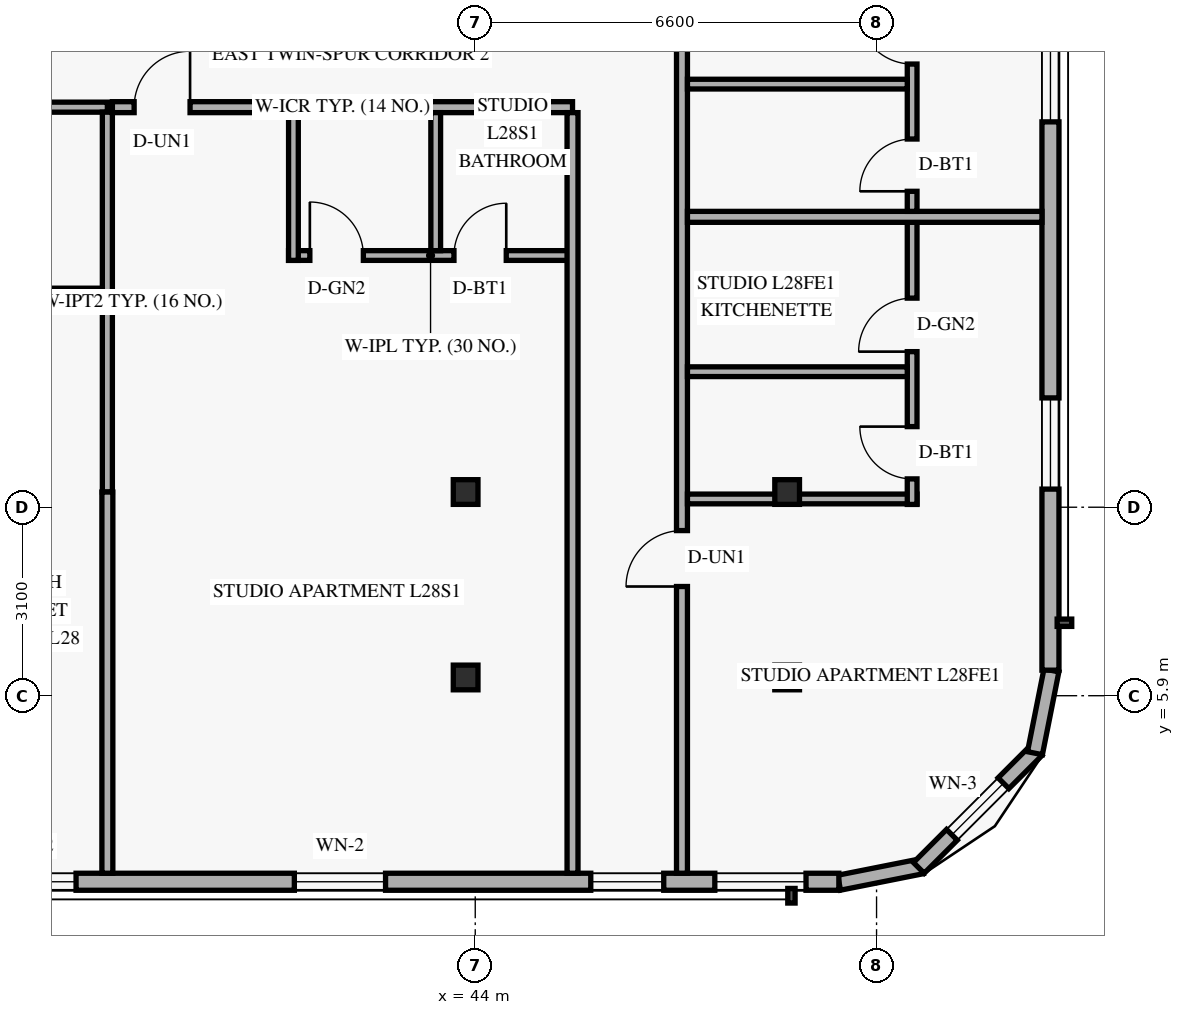
"""IFC4 building model, lengths in metres.
Left out: names, types, materials, properties, quantities, classifications, styles, units other than length and angle.
Written with IfcOpenShell. Run it as: python <this file> out.ifc"""

import sys

from ifc_helpers import new_model, si_unit, direction, frame, frame_2d, origin, origin_2d, place, context, subcontext, project, spatial, rectangle, hollow_rectangle, extrude, element, fill, save


model = new_model("IFC4")
c1 = context("Model", 3, precision=1e-05, world=origin(), true_north=direction((0.0, 1.0)))
c2 = subcontext(c1, "Body", "Model", "MODEL_VIEW")
j1 = project(units=[si_unit("LENGTHUNIT", "METRE"), si_unit("PLANEANGLEUNIT", "RADIAN")], contexts=[c1])
p1 = place(None, origin())
s1 = spatial("IfcSite", under=j1, at=p1, CompositionType="ELEMENT")
p2 = place(p1, origin())
s2 = spatial("IfcBuilding", under=s1, at=p2, CompositionType="ELEMENT")
p3 = place(p2, frame((0.0, 0.0, 109.8)))
s3 = spatial("IfcBuildingStorey", under=s2, at=p3, CompositionType="ELEMENT", Elevation=109.8)
for number, where, z_axis, x_axis in (
    (1, (43.779, 6.2, 0.0), (0.035, 0.0, 0.999), (0.0, 1.0, 0.0)),
    (2, (43.779, 9.25, 0.0), (0.035, 0.0, 0.999), (0.0, 1.0, 0.0)),
):
    element("IfcColumn", number, at=place(p3, frame(where, z_axis=z_axis, x_axis=x_axis)), inside=s3, PredefinedType="COLUMN", context=c2, shape_type="SweptSolid", body=[
        extrude(hollow_rectangle(XDim=0.406, YDim=0.406, WallThickness=0.016, at=origin_2d()), origin(), (0.0, 0.0, 1.0), 3.602),
    ])
for number, where, z_axis, x_axis in (
    (3, (49.025, 6.2, 0.0), (0.058, 0.0, 0.998), (0.0, 1.0, 0.0)),
    (4, (49.025, 9.25, 0.0), (0.058, 0.0, 0.998), (0.0, 1.0, 0.0)),
):
    element("IfcColumn", number, at=place(p3, frame(where, z_axis=z_axis, x_axis=x_axis)), inside=s3, PredefinedType="COLUMN", context=c2, shape_type="SweptSolid", body=[
        extrude(hollow_rectangle(XDim=0.406, YDim=0.406, WallThickness=0.016, at=origin_2d()), origin(), (0.0, 0.0, 1.0), 3.606),
    ])
p4 = place(p3, frame((49.983, 2.824, 0.0), z_axis=(0.0, 0.0, 1.0), x_axis=(0.980809899341, 0.19496651342, 0.0)))
e5 = element("IfcWall", 5, at=p4, inside=s3, PredefinedType="SOLIDWALL", context=c2, shape_type="SweptSolid", body=[
    extrude(rectangle(XDim=1.389, YDim=0.25, at=frame_2d((0.694, 0.0))), origin(), (0.0, 0.0, 1.0), 3.36),
])
p5 = place(p3, frame((51.295, 3.068, 0.0), z_axis=(0.0, 0.0, 1.0), x_axis=(0.707151344399, 0.707062215165, 0.0)))
e6 = element("IfcWall", 6, at=p5, inside=s3, PredefinedType="SOLIDWALL", context=c2, shape_type="SweptSolid", body=[
    extrude(rectangle(XDim=2.739, YDim=0.25, at=frame_2d((1.37, 0.0))), origin(), (0.0, 0.0, 1.0), 3.36),
])
p6 = place(p5, frame((0.77, 0.0, 0.85)))
e7 = element("IfcOpeningElement", 7, at=p6, cuts=e6, PredefinedType="OPENING", context=c2, shape_type="SweptSolid", body=[
    extrude(rectangle(XDim=1.2, YDim=1.5, at=frame_2d((0.6, 0.75))), frame((0.0, 0.135, 0.0), z_axis=(0.0, -1.0, 0.0), x_axis=(1.0, 0.0, 0.0)), (0.0, 0.0, 1.0), 0.27),
])
p7 = place(p3, frame((53.205, 4.955, 0.0), z_axis=(0.0, 0.0, 1.0), x_axis=(0.195000137217, 0.980803214965, 0.0)))
e8 = element("IfcWall", 8, at=p7, inside=s3, PredefinedType="SOLIDWALL", context=c2, shape_type="SweptSolid", body=[
    extrude(rectangle(XDim=1.388, YDim=0.25, at=frame_2d((0.694, 0.0))), origin(), (0.0, 0.0, 1.0), 3.36),
])
p8 = place(p3, frame((34.4, 2.84, 0.0), z_axis=(0.0, 0.0, 1.0), x_axis=(1.0, 0.0, 0.0)))
e9 = element("IfcWall", 9, at=p8, inside=s3, PredefinedType="SOLIDWALL", context=c2, shape_type="SweptSolid", body=[
    extrude(rectangle(XDim=15.58, YDim=0.28, at=frame_2d((7.79, 0.0))), origin(), (0.0, 0.0, 1.0), 3.36),
])
p9 = place(p8, frame((1.535, 0.0, 0.85)))
e10 = element("IfcOpeningElement", 10, at=p9, cuts=e9, PredefinedType="OPENING", context=c2, shape_type="SweptSolid", body=[
    extrude(rectangle(XDim=1.5, YDim=1.55, at=frame_2d((0.75, 0.775))), frame((0.0, 0.15, 0.0), z_axis=(0.0, -1.0, 0.0), x_axis=(1.0, 0.0, 0.0)), (0.0, 0.0, 1.0), 0.3),
])
p10 = place(p8, frame((6.625, 0.0, 0.85)))
e11 = element("IfcOpeningElement", 11, at=p10, cuts=e9, PredefinedType="OPENING", context=c2, shape_type="SweptSolid", body=[
    extrude(rectangle(XDim=1.5, YDim=1.55, at=frame_2d((0.75, 0.775))), frame((0.0, 0.15, 0.0), z_axis=(0.0, -1.0, 0.0), x_axis=(1.0, 0.0, 0.0)), (0.0, 0.0, 1.0), 0.3),
])
p11 = place(p8, frame((11.5, 0.0, 0.85)))
e12 = element("IfcOpeningElement", 12, at=p11, cuts=e9, PredefinedType="OPENING", context=c2, shape_type="SweptSolid", body=[
    extrude(rectangle(XDim=1.2, YDim=1.5, at=frame_2d((0.6, 0.75))), frame((0.0, 0.15, 0.0), z_axis=(0.0, -1.0, 0.0), x_axis=(1.0, 0.0, 0.0)), (0.0, 0.0, 1.0), 0.3),
])
p12 = place(p8, frame((13.54, 0.0, 0.85)))
e13 = element("IfcOpeningElement", 13, at=p12, cuts=e9, PredefinedType="OPENING", context=c2, shape_type="SweptSolid", body=[
    extrude(rectangle(XDim=1.5, YDim=1.55, at=frame_2d((0.75, 0.775))), frame((0.0, 0.15, 0.0), z_axis=(0.0, -1.0, 0.0), x_axis=(1.0, 0.0, 0.0)), (0.0, 0.0, 1.0), 0.3),
])
p13 = place(p3, frame((53.46, 6.32, 0.0), z_axis=(0.0, 0.0, 1.0), x_axis=(0.0, 1.0, 0.0)))
e14 = element("IfcWall", 14, at=p13, inside=s3, PredefinedType="SOLIDWALL", context=c2, shape_type="SweptSolid", body=[
    extrude(rectangle(XDim=12.08, YDim=0.28, at=frame_2d((6.04, 0.0))), origin(), (0.0, 0.0, 1.0), 3.36),
])
p14 = place(p13, frame((2.978, 0.0, 0.85)))
e15 = element("IfcOpeningElement", 15, at=p14, cuts=e14, PredefinedType="OPENING", context=c2, shape_type="SweptSolid", body=[
    extrude(rectangle(XDim=1.5, YDim=1.55, at=frame_2d((0.75, 0.775))), frame((0.0, 0.15, 0.0), z_axis=(0.0, -1.0, 0.0), x_axis=(1.0, 0.0, 0.0)), (0.0, 0.0, 1.0), 0.3),
])
p15 = place(p13, frame((9.018, 0.0, 0.85)))
e16 = element("IfcOpeningElement", 16, at=p15, cuts=e14, PredefinedType="OPENING", context=c2, shape_type="SweptSolid", body=[
    extrude(rectangle(XDim=1.5, YDim=1.55, at=frame_2d((0.75, 0.775))), frame((0.0, 0.15, 0.0), z_axis=(0.0, -1.0, 0.0), x_axis=(1.0, 0.0, 0.0)), (0.0, 0.0, 1.0), 0.3),
])
p16 = place(p3, frame((32.732, 15.58, 0.0), z_axis=(0.0, 0.0, 1.0), x_axis=(1.0, 0.0, 0.0)))
e17 = element("IfcWall", 17, at=p16, inside=s3, PredefinedType="PARTITIONING", context=c2, shape_type="SweptSolid", body=[
    extrude(rectangle(XDim=5.218, YDim=0.165, at=frame_2d((2.609, 0.0))), origin(), (0.0, 0.0, 1.0), 2.731),
])
p17 = place(p16, frame((2.867, 0.0, 0.0)))
e18 = element("IfcOpeningElement", 18, at=p17, cuts=e17, PredefinedType="OPENING", context=c2, shape_type="SweptSolid", body=[
    extrude(rectangle(XDim=0.95, YDim=2.15, at=frame_2d((0.475, 1.075))), frame((0.0, 0.093, 0.0), z_axis=(0.0, -1.0, 0.0), x_axis=(1.0, 0.0, 0.0)), (0.0, 0.0, 1.0), 0.185),
])
p18 = place(p3, frame((37.95, 9.25, 0.0), z_axis=(0.0, 0.0, 1.0), x_axis=(0.0, 1.0, 0.0)))
e19 = element("IfcWall", 19, at=p18, inside=s3, PredefinedType="PARTITIONING", context=c2, shape_type="SweptSolid", body=[
    extrude(rectangle(XDim=6.248, YDim=0.165, at=frame_2d((3.124, 0.0))), origin(), (0.0, 0.0, 1.0), 2.731),
])
p19 = place(p3, frame((32.732, 12.52, 0.0), z_axis=(0.0, 0.0, 1.0), x_axis=(1.0, 0.0, 0.0)))
e20 = element("IfcWall", 20, at=p19, inside=s3, PredefinedType="PARTITIONING", context=c2, shape_type="SweptSolid", body=[
    extrude(rectangle(XDim=5.135, YDim=0.165, at=frame_2d((2.567, 0.0))), origin(), (0.0, 0.0, 1.0), 2.731),
])
p20 = place(p19, frame((2.768, 0.0, 0.0)))
e21 = element("IfcOpeningElement", 21, at=p20, cuts=e20, PredefinedType="OPENING", context=c2, shape_type="SweptSolid", body=[
    extrude(rectangle(XDim=0.9, YDim=2.1, at=frame_2d((0.45, 1.05))), frame((0.0, 0.093, 0.0), z_axis=(0.0, -1.0, 0.0), x_axis=(1.0, 0.0, 0.0)), (0.0, 0.0, 1.0), 0.185),
])
p21 = place(p3, frame((38.032, 15.58, 0.0), z_axis=(0.0, 0.0, 1.0), x_axis=(1.0, 0.0, 0.0)))
e22 = element("IfcWall", 22, at=p21, inside=s3, PredefinedType="STANDARD", context=c2, shape_type="SweptSolid", body=[
    extrude(rectangle(XDim=7.568, YDim=0.18, at=frame_2d((3.784, 0.0))), origin(), (0.0, 0.0, 1.0), 2.731),
])
p22 = place(p21, frame((0.357, 0.0, 0.0)))
e23 = element("IfcOpeningElement", 23, at=p22, cuts=e22, PredefinedType="OPENING", context=c2, shape_type="SweptSolid", body=[
    extrude(rectangle(XDim=0.92, YDim=2.15, at=frame_2d((0.46, 1.075))), frame((0.0, 0.1, 0.0), z_axis=(0.0, -1.0, 0.0), x_axis=(1.0, 0.0, 0.0)), (0.0, 0.0, 1.0), 0.2),
])
p23 = place(p3, frame((37.95, 2.98, 0.0), z_axis=(0.0, 0.0, 1.0), x_axis=(0.0, 1.0, 0.0)))
e24 = element("IfcWall", 24, at=p23, inside=s3, PredefinedType="PARTITIONING", context=c2, shape_type="SweptSolid", body=[
    extrude(rectangle(XDim=6.27, YDim=0.18, at=frame_2d((3.135, 0.0))), origin(), (0.0, 0.0, 1.0), 2.731),
])
p24 = place(p3, frame((40.93, 13.14, 0.0), z_axis=(0.0, 0.0, 1.0), x_axis=(1.0, 0.0, 0.0)))
e25 = element("IfcWall", 25, at=p24, inside=s3, PredefinedType="PLUMBINGWALL", context=c2, shape_type="SweptSolid", body=[
    extrude(rectangle(XDim=4.67, YDim=0.16, at=frame_2d((2.335, 0.0))), origin(), (0.0, 0.0, 1.0), 2.731),
])
p25 = place(p24, frame((0.35, 0.0, 0.0)))
e26 = element("IfcOpeningElement", 26, at=p25, cuts=e25, PredefinedType="OPENING", context=c2, shape_type="SweptSolid", body=[
    extrude(rectangle(XDim=0.88, YDim=2.12, at=frame_2d((0.44, 1.06))), frame((0.0, 0.09, 0.0), z_axis=(0.0, -1.0, 0.0), x_axis=(1.0, 0.0, 0.0)), (0.0, 0.0, 1.0), 0.18),
])
p26 = place(p24, frame((2.72, 0.0, 0.0)))
e27 = element("IfcOpeningElement", 27, at=p26, cuts=e25, PredefinedType="OPENING", context=c2, shape_type="SweptSolid", body=[
    extrude(rectangle(XDim=0.86, YDim=2.12, at=frame_2d((0.43, 1.06))), frame((0.0, 0.09, 0.0), z_axis=(0.0, -1.0, 0.0), x_axis=(1.0, 0.0, 0.0)), (0.0, 0.0, 1.0), 0.18),
])
p27 = place(p3, frame((41.01, 13.06, 0.0), z_axis=(0.0, 0.0, 1.0), x_axis=(0.0, 1.0, 0.0)))
e28 = element("IfcWall", 28, at=p27, inside=s3, PredefinedType="PLUMBINGWALL", context=c2, shape_type="SweptSolid", body=[
    extrude(rectangle(XDim=2.43, YDim=0.16, at=frame_2d((1.215, 0.0))), origin(), (0.0, 0.0, 1.0), 2.988),
])
p28 = place(p3, frame((43.35, 13.22, 0.0), z_axis=(0.0, 0.0, 1.0), x_axis=(0.0, 1.0, 0.0)))
e29 = element("IfcWall", 29, at=p28, inside=s3, PredefinedType="PLUMBINGWALL", context=c2, shape_type="SweptSolid", body=[
    extrude(rectangle(XDim=2.27, YDim=0.16, at=frame_2d((1.135, 0.0))), origin(), (0.0, 0.0, 1.0), 2.988),
])
p29 = place(p3, frame((47.4, 2.98, 0.0), z_axis=(0.0, 0.0, 1.0), x_axis=(0.0, 1.0, 0.0)))
e30 = element("IfcWall", 30, at=p29, inside=s3, PredefinedType="STANDARD", context=c2, shape_type="SweptSolid", body=[
    extrude(rectangle(XDim=42.04, YDim=0.18, at=frame_2d((21.02, 0.0))), origin(), (0.0, 0.0, 1.0), 2.731),
])
p30 = place(p29, frame((4.716, 0.0, 0.0)))
e31 = element("IfcOpeningElement", 31, at=p30, cuts=e30, PredefinedType="OPENING", context=c2, shape_type="SweptSolid", body=[
    extrude(rectangle(XDim=0.92, YDim=2.15, at=frame_2d((0.46, 1.075))), frame((0.0, 0.1, 0.0), z_axis=(0.0, -1.0, 0.0), x_axis=(1.0, 0.0, 0.0)), (0.0, 0.0, 1.0), 0.2),
])
p31 = place(p29, frame((15.796, 0.0, 0.0)))
e32 = element("IfcOpeningElement", 32, at=p31, cuts=e30, PredefinedType="OPENING", context=c2, shape_type="SweptSolid", body=[
    extrude(rectangle(XDim=0.92, YDim=2.15, at=frame_2d((0.46, 1.075))), frame((0.0, 0.1, 0.0), z_axis=(0.0, -1.0, 0.0), x_axis=(1.0, 0.0, 0.0)), (0.0, 0.0, 1.0), 0.2),
])
p32 = place(p29, frame((23.565, 0.0, 0.0)))
e33 = element("IfcOpeningElement", 33, at=p32, cuts=e30, PredefinedType="OPENING", context=c2, shape_type="SweptSolid", body=[
    extrude(rectangle(XDim=0.92, YDim=2.15, at=frame_2d((0.46, 1.075))), frame((0.0, 0.1, 0.0), z_axis=(0.0, -1.0, 0.0), x_axis=(1.0, 0.0, 0.0)), (0.0, 0.0, 1.0), 0.2),
])
p33 = place(p29, frame((39.348, 0.0, 0.0)))
e34 = element("IfcOpeningElement", 34, at=p33, cuts=e30, PredefinedType="OPENING", context=c2, shape_type="SweptSolid", body=[
    extrude(rectangle(XDim=0.92, YDim=2.15, at=frame_2d((0.46, 1.075))), frame((0.0, 0.1, 0.0), z_axis=(0.0, -1.0, 0.0), x_axis=(1.0, 0.0, 0.0)), (0.0, 0.0, 1.0), 0.2),
])
p34 = place(p3, frame((45.6, 2.98, 0.0), z_axis=(0.0, 0.0, 1.0), x_axis=(0.0, 1.0, 0.0)))
e35 = element("IfcWall", 35, at=p34, inside=s3, PredefinedType="STANDARD", context=c2, shape_type="SweptSolid", body=[
    extrude(rectangle(XDim=12.51, YDim=0.18, at=frame_2d((6.255, 0.0))), origin(), (0.0, 0.0, 1.0), 2.731),
])
p35 = place(p3, frame((47.49, 9.136, 0.0), z_axis=(0.0, 0.0, 1.0), x_axis=(1.0, 0.0, 0.0)))
e36 = element("IfcWall", 36, at=p35, inside=s3, PredefinedType="PLUMBINGWALL", context=c2, shape_type="SweptSolid", body=[
    extrude(rectangle(XDim=3.775, YDim=0.16, at=frame_2d((1.888, 0.0))), origin(), (0.0, 0.0, 1.0), 2.731),
])
p36 = place(p3, frame((51.185, 9.046, 0.0), z_axis=(0.0, 0.0, 1.0), x_axis=(0.0, 1.0, 0.0)))
e37 = element("IfcWall", 37, at=p36, inside=s3, PredefinedType="PLUMBINGWALL", context=c2, shape_type="SweptSolid", body=[
    extrude(rectangle(XDim=4.73, YDim=0.16, at=frame_2d((2.365, 0.0))), origin(), (0.0, 0.0, 1.0), 3.36),
])
p37 = place(p36, frame((0.42, 0.0, 0.0)))
e38 = element("IfcOpeningElement", 38, at=p37, cuts=e37, PredefinedType="OPENING", context=c2, shape_type="SweptSolid", body=[
    extrude(rectangle(XDim=0.86, YDim=2.12, at=frame_2d((0.43, 1.06))), frame((0.0, 0.09, 0.0), z_axis=(0.0, -1.0, 0.0), x_axis=(1.0, 0.0, 0.0)), (0.0, 0.0, 1.0), 0.18),
])
p38 = place(p36, frame((2.513, 0.0, 0.0)))
e39 = element("IfcOpeningElement", 39, at=p38, cuts=e37, PredefinedType="OPENING", context=c2, shape_type="SweptSolid", body=[
    extrude(rectangle(XDim=0.88, YDim=2.12, at=frame_2d((0.44, 1.06))), frame((0.0, 0.09, 0.0), z_axis=(0.0, -1.0, 0.0), x_axis=(1.0, 0.0, 0.0)), (0.0, 0.0, 1.0), 0.18),
])
p39 = place(p3, frame((47.49, 11.229, 0.0), z_axis=(0.0, 0.0, 1.0), x_axis=(1.0, 0.0, 0.0)))
e40 = element("IfcWall", 40, at=p39, inside=s3, PredefinedType="PLUMBINGWALL", context=c2, shape_type="SweptSolid", body=[
    extrude(rectangle(XDim=3.615, YDim=0.16, at=frame_2d((1.808, 0.0))), origin(), (0.0, 0.0, 1.0), 2.809),
])
p40 = place(p3, frame((47.49, 13.776, 0.0), z_axis=(0.0, 0.0, 1.0), x_axis=(1.0, 0.0, 0.0)))
e41 = element("IfcWall", 41, at=p40, inside=s3, PredefinedType="PARTITIONING", context=c2, shape_type="SweptSolid", body=[
    extrude(rectangle(XDim=5.83, YDim=0.18, at=frame_2d((2.915, 0.0))), origin(), (0.0, 0.0, 1.0), 2.809),
])
p41 = place(p3, frame((51.185, 13.866, 0.0), z_axis=(0.0, 0.0, 1.0), x_axis=(0.0, 1.0, 0.0)))
e42 = element("IfcWall", 42, at=p41, inside=s3, PredefinedType="PLUMBINGWALL", context=c2, shape_type="SweptSolid", body=[
    extrude(rectangle(XDim=4.64, YDim=0.16, at=frame_2d((2.32, 0.0))), origin(), (0.0, 0.0, 1.0), 3.36),
])
p42 = place(p41, frame((0.33, 0.0, 0.0)))
e43 = element("IfcOpeningElement", 43, at=p42, cuts=e42, PredefinedType="OPENING", context=c2, shape_type="SweptSolid", body=[
    extrude(rectangle(XDim=0.86, YDim=2.12, at=frame_2d((0.43, 1.06))), frame((0.0, 0.09, 0.0), z_axis=(0.0, -1.0, 0.0), x_axis=(1.0, 0.0, 0.0)), (0.0, 0.0, 1.0), 0.18),
])
p43 = place(p41, frame((2.423, 0.0, 0.0)))
e44 = element("IfcOpeningElement", 44, at=p43, cuts=e42, PredefinedType="OPENING", context=c2, shape_type="SweptSolid", body=[
    extrude(rectangle(XDim=0.88, YDim=2.12, at=frame_2d((0.44, 1.06))), frame((0.0, 0.09, 0.0), z_axis=(0.0, -1.0, 0.0), x_axis=(1.0, 0.0, 0.0)), (0.0, 0.0, 1.0), 0.18),
])
p44 = place(p3, frame((47.49, 15.959, 0.0), z_axis=(0.0, 0.0, 1.0), x_axis=(1.0, 0.0, 0.0)))
e45 = element("IfcWall", 45, at=p44, inside=s3, PredefinedType="PLUMBINGWALL", context=c2, shape_type="SweptSolid", body=[
    extrude(rectangle(XDim=3.615, YDim=0.16, at=frame_2d((1.808, 0.0))), origin(), (0.0, 0.0, 1.0), 2.809),
])
p45 = place(p6, origin())
e46 = element("IfcWindow", 46, at=p45, inside=s3, PartitioningType="SINGLE_PANEL", PredefinedType="WINDOW", context=c2, shape_type="SweptSolid", body=[
    extrude(rectangle(XDim=1.2, YDim=1.5, at=frame_2d((0.6, 0.75))), frame((0.0, 0.03, 0.0), z_axis=(0.0, -1.0, 0.0), x_axis=(1.0, 0.0, 0.0)), (0.0, 0.0, 1.0), 0.06),
])
fill(e7, e46)
p46 = place(p9, origin())
e47 = element("IfcWindow", 47, at=p46, inside=s3, PartitioningType="SINGLE_PANEL", PredefinedType="WINDOW", context=c2, shape_type="SweptSolid", body=[
    extrude(rectangle(XDim=1.5, YDim=1.55, at=frame_2d((0.75, 0.775))), frame((0.0, 0.03, 0.0), z_axis=(0.0, -1.0, 0.0), x_axis=(1.0, 0.0, 0.0)), (0.0, 0.0, 1.0), 0.06),
])
fill(e10, e47)
p47 = place(p10, origin())
e48 = element("IfcWindow", 48, at=p47, inside=s3, PartitioningType="SINGLE_PANEL", PredefinedType="WINDOW", context=c2, shape_type="SweptSolid", body=[
    extrude(rectangle(XDim=1.5, YDim=1.55, at=frame_2d((0.75, 0.775))), frame((0.0, 0.03, 0.0), z_axis=(0.0, -1.0, 0.0), x_axis=(1.0, 0.0, 0.0)), (0.0, 0.0, 1.0), 0.06),
])
fill(e11, e48)
p48 = place(p11, origin())
e49 = element("IfcWindow", 49, at=p48, inside=s3, PartitioningType="SINGLE_PANEL", PredefinedType="WINDOW", context=c2, shape_type="SweptSolid", body=[
    extrude(rectangle(XDim=1.2, YDim=1.5, at=frame_2d((0.6, 0.75))), frame((0.0, 0.03, 0.0), z_axis=(0.0, -1.0, 0.0), x_axis=(1.0, 0.0, 0.0)), (0.0, 0.0, 1.0), 0.06),
])
fill(e12, e49)
p49 = place(p12, origin())
e50 = element("IfcWindow", 50, at=p49, inside=s3, PartitioningType="SINGLE_PANEL", PredefinedType="WINDOW", context=c2, shape_type="SweptSolid", body=[
    extrude(rectangle(XDim=1.5, YDim=1.55, at=frame_2d((0.75, 0.775))), frame((0.0, 0.03, 0.0), z_axis=(0.0, -1.0, 0.0), x_axis=(1.0, 0.0, 0.0)), (0.0, 0.0, 1.0), 0.06),
])
fill(e13, e50)
p50 = place(p14, origin())
e51 = element("IfcWindow", 51, at=p50, inside=s3, PartitioningType="SINGLE_PANEL", PredefinedType="WINDOW", context=c2, shape_type="SweptSolid", body=[
    extrude(rectangle(XDim=1.5, YDim=1.55, at=frame_2d((0.75, 0.775))), frame((0.0, 0.03, 0.0), z_axis=(0.0, -1.0, 0.0), x_axis=(1.0, 0.0, 0.0)), (0.0, 0.0, 1.0), 0.06),
])
fill(e15, e51)
p51 = place(p15, origin())
e52 = element("IfcWindow", 52, at=p51, inside=s3, PartitioningType="SINGLE_PANEL", PredefinedType="WINDOW", context=c2, shape_type="SweptSolid", body=[
    extrude(rectangle(XDim=1.5, YDim=1.55, at=frame_2d((0.75, 0.775))), frame((0.0, 0.03, 0.0), z_axis=(0.0, -1.0, 0.0), x_axis=(1.0, 0.0, 0.0)), (0.0, 0.0, 1.0), 0.06),
])
fill(e16, e52)
p52 = place(p22, origin())
e53 = element("IfcDoor", 53, at=p52, inside=s3, OperationType="SINGLE_SWING_RIGHT", PredefinedType="DOOR", context=c2, shape_type="SweptSolid", body=[
    extrude(rectangle(XDim=0.92, YDim=2.15, at=frame_2d((0.46, 1.075))), frame((0.0, 0.025, 0.0), z_axis=(0.0, -1.0, 0.0), x_axis=(1.0, 0.0, 0.0)), (0.0, 0.0, 1.0), 0.05),
])
fill(e23, e53)
p53 = place(p25, origin())
e54 = element("IfcDoor", 54, at=p53, inside=s3, OperationType="SINGLE_SWING_LEFT", PredefinedType="DOOR", context=c2, shape_type="SweptSolid", body=[
    extrude(rectangle(XDim=0.88, YDim=2.12, at=frame_2d((0.44, 1.06))), frame((0.0, 0.025, 0.0), z_axis=(0.0, -1.0, 0.0), x_axis=(1.0, 0.0, 0.0)), (0.0, 0.0, 1.0), 0.05),
])
fill(e26, e54)
p54 = place(p26, origin())
e55 = element("IfcDoor", 55, at=p54, inside=s3, OperationType="SINGLE_SWING_RIGHT", PredefinedType="DOOR", context=c2, shape_type="SweptSolid", body=[
    extrude(rectangle(XDim=0.86, YDim=2.12, at=frame_2d((0.43, 1.06))), frame((0.0, 0.025, 0.0), z_axis=(0.0, -1.0, 0.0), x_axis=(1.0, 0.0, 0.0)), (0.0, 0.0, 1.0), 0.05),
])
fill(e27, e55)
p55 = place(p30, origin())
e56 = element("IfcDoor", 56, at=p55, inside=s3, OperationType="SINGLE_SWING_LEFT", PredefinedType="DOOR", context=c2, shape_type="SweptSolid", body=[
    extrude(rectangle(XDim=0.92, YDim=2.15, at=frame_2d((0.46, 1.075))), frame((0.0, 0.025, 0.0), z_axis=(0.0, -1.0, 0.0), x_axis=(1.0, 0.0, 0.0)), (0.0, 0.0, 1.0), 0.05),
])
fill(e31, e56)
p56 = place(p37, origin())
e57 = element("IfcDoor", 57, at=p56, inside=s3, OperationType="SINGLE_SWING_RIGHT", PredefinedType="DOOR", context=c2, shape_type="SweptSolid", body=[
    extrude(rectangle(XDim=0.86, YDim=2.12, at=frame_2d((0.43, 1.06))), frame((0.0, 0.025, 0.0), z_axis=(0.0, -1.0, 0.0), x_axis=(1.0, 0.0, 0.0)), (0.0, 0.0, 1.0), 0.05),
])
fill(e38, e57)
p57 = place(p38, origin())
e58 = element("IfcDoor", 58, at=p57, inside=s3, OperationType="SINGLE_SWING_LEFT", PredefinedType="DOOR", context=c2, shape_type="SweptSolid", body=[
    extrude(rectangle(XDim=0.88, YDim=2.12, at=frame_2d((0.44, 1.06))), frame((0.0, 0.025, 0.0), z_axis=(0.0, -1.0, 0.0), x_axis=(1.0, 0.0, 0.0)), (0.0, 0.0, 1.0), 0.05),
])
fill(e39, e58)
p58 = place(p42, origin())
e59 = element("IfcDoor", 59, at=p58, inside=s3, OperationType="SINGLE_SWING_LEFT", PredefinedType="DOOR", context=c2, shape_type="SweptSolid", body=[
    extrude(rectangle(XDim=0.86, YDim=2.12, at=frame_2d((0.43, 1.06))), frame((0.0, 0.025, 0.0), z_axis=(0.0, -1.0, 0.0), x_axis=(1.0, 0.0, 0.0)), (0.0, 0.0, 1.0), 0.05),
])
fill(e43, e59)
p59 = place(p43, origin())
e60 = element("IfcDoor", 60, at=p59, inside=s3, OperationType="SINGLE_SWING_RIGHT", PredefinedType="DOOR", context=c2, shape_type="SweptSolid", body=[
    extrude(rectangle(XDim=0.88, YDim=2.12, at=frame_2d((0.44, 1.06))), frame((0.0, 0.025, 0.0), z_axis=(0.0, -1.0, 0.0), x_axis=(1.0, 0.0, 0.0)), (0.0, 0.0, 1.0), 0.05),
])
fill(e44, e60)
save(model, sys.argv[1])
